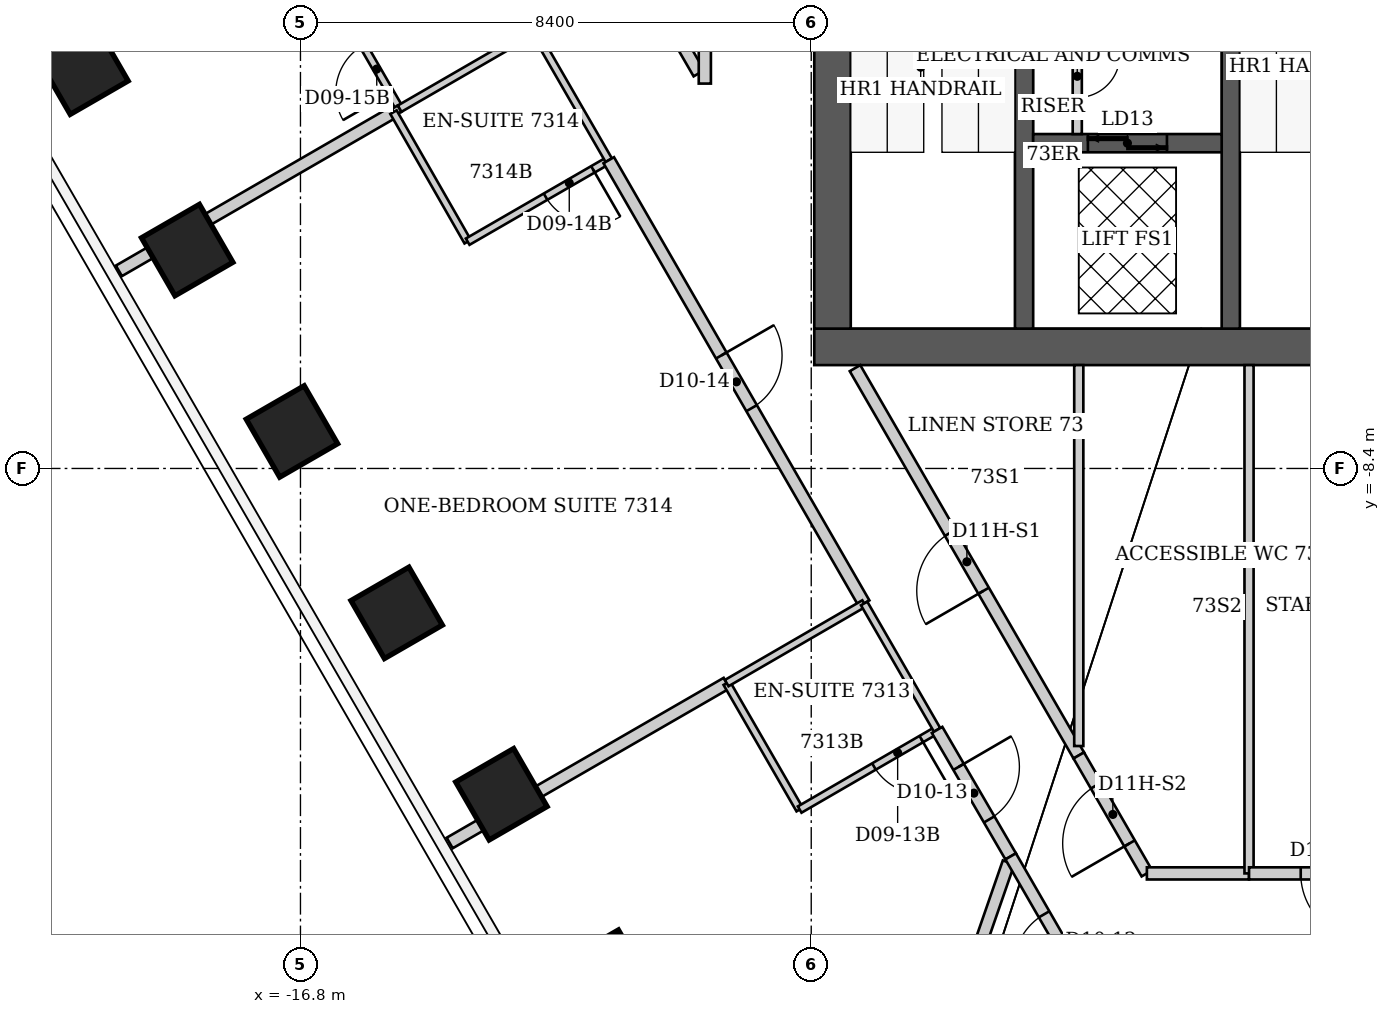
"""IFC4 building model, lengths in metres.
Left out: names, types, materials, properties, quantities, classifications, styles, units other than length and angle.
Written with IfcOpenShell. Run it as: python <this file> out.ifc"""

import sys

from ifc_helpers import new_model, si_unit, direction, frame, frame_2d, origin, origin_2d, place, context, subcontext, project, spatial, rectangle, extrude, element, fill, save


model = new_model("IFC4")
c1 = context("Model", 3, precision=1e-05, world=origin(), true_north=direction((0.0, 1.0)))
c2 = subcontext(c1, "Body", "Model", "MODEL_VIEW")
j1 = project(units=[si_unit("LENGTHUNIT", "METRE"), si_unit("PLANEANGLEUNIT", "RADIAN")], contexts=[c1])
p1 = place(None, origin())
s1 = spatial("IfcSite", under=j1, at=p1, CompositionType="ELEMENT")
p2 = place(p1, origin())
s2 = spatial("IfcBuilding", under=s1, at=p2, CompositionType="ELEMENT")
p3 = place(p2, frame((0.0, 0.0, 291.2)))
s3 = spatial("IfcBuildingStorey", under=s2, at=p3, CompositionType="ELEMENT", Elevation=291.2)
for number, where, z_axis, x_axis in (
    (1, (-11.773, -16.742, 0.0), (0.0, 0.0, 1.0), (-0.866, -0.5, 0.0)),
    (2, (-13.495, -13.759, 0.0), (0.0, 0.0, 1.0), (-0.866, -0.5, 0.0)),
    (3, (-15.218, -10.775, 0.0), (0.0, 0.0, 1.0), (-0.866, -0.5, 0.0)),
    (4, (-16.94, -7.792, 0.0), (0.0, 0.0, 1.0), (-0.866, -0.5, 0.0)),
    (5, (-18.663, -4.808, 0.0), (0.0, 0.0, 1.0), (-0.866, -0.5, 0.0)),
    (6, (-20.385, -1.824, 0.0), (0.0, 0.0, 1.0), (-0.866, -0.5, 0.0)),
):
    element("IfcColumn", number, at=place(p3, frame(where, z_axis=z_axis, x_axis=x_axis)), inside=s3, PredefinedType="COLUMN", context=c2, shape_type="SweptSolid", body=[
        extrude(rectangle(XDim=1.1, YDim=1.1, at=origin_2d()), origin(), (0.0, 0.0, 1.0), 3.8),
    ])
p4 = place(p3, frame((-8.35, -6.4, 0.0), z_axis=(0.0, 0.0, 1.0), x_axis=(1.0, 0.0, 0.0)))
e7 = element("IfcWall", 7, at=p4, inside=s3, PredefinedType="SHEAR", context=c2, shape_type="SweptSolid", body=[
    extrude(rectangle(XDim=16.7, YDim=0.6, at=frame_2d((8.35, 0.0))), origin(), (0.0, 0.0, 1.0), 3.8),
])
p5 = place(p3, frame((-8.05, -6.1, 0.0), z_axis=(0.0, 0.0, 1.0), x_axis=(0.0, 1.0, 0.0)))
e8 = element("IfcWall", 8, at=p5, inside=s3, PredefinedType="SHEAR", context=c2, shape_type="SweptSolid", body=[
    extrude(rectangle(XDim=12.2, YDim=0.6, at=frame_2d((6.1, 0.0))), origin(), (0.0, 0.0, 1.0), 3.8),
])
p6 = place(p5, frame((7.6, 0.0, 0.0)))
e9 = element("IfcOpeningElement", 9, at=p6, cuts=e8, PredefinedType="OPENING", context=c2, shape_type="SweptSolid", body=[
    extrude(rectangle(XDim=1.2, YDim=2.2, at=frame_2d((0.6, 1.1))), frame((0.0, 0.3, 0.0), z_axis=(0.0, -1.0, 0.0), x_axis=(1.0, 0.0, 0.0)), (0.0, 0.0, 1.0), 0.6),
])
for number, where, z_axis, x_axis in (
    (10, (-4.9, -6.1, 0.0), (0.0, 0.0, 1.0), (0.0, 1.0, 0.0)),
    (11, (-1.5, -6.1, 0.0), (0.0, 0.0, 1.0), (0.0, 1.0, 0.0)),
):
    element("IfcWall", number, at=place(p3, frame(where, z_axis=z_axis, x_axis=x_axis)), inside=s3, PredefinedType="SHEAR", context=c2, shape_type="SweptSolid", body=[
        extrude(rectangle(XDim=7.2, YDim=0.3, at=frame_2d((3.6, 0.0))), origin(), (0.0, 0.0, 1.0), 3.8),
    ])
p7 = place(p3, frame((-4.75, -3.05, 0.0), z_axis=(0.0, 0.0, 1.0), x_axis=(1.0, 0.0, 0.0)))
e12 = element("IfcWall", 12, at=p7, inside=s3, PredefinedType="SHEAR", context=c2, shape_type="SweptSolid", body=[
    extrude(rectangle(XDim=3.1, YDim=0.3, at=frame_2d((1.55, 0.0))), origin(), (0.0, 0.0, 1.0), 3.8),
])
p8 = place(p7, frame((0.9, 0.0, 0.0)))
e13 = element("IfcOpeningElement", 13, at=p8, cuts=e12, PredefinedType="OPENING", context=c2, shape_type="SweptSolid", body=[
    extrude(rectangle(XDim=1.3, YDim=2.1, at=frame_2d((0.65, 1.05))), frame((0.0, 0.15, 0.0), z_axis=(0.0, -1.0, 0.0), x_axis=(1.0, 0.0, 0.0)), (0.0, 0.0, 1.0), 0.3),
])
p9 = place(p3, frame((-19.786, -5.15, 0.0), z_axis=(0.0, 0.0, 1.0), x_axis=(0.865819112627, 0.500357136663, 0.0)))
e14 = element("IfcWall", 14, at=p9, inside=s3, PredefinedType="PARTITIONING", context=c2, shape_type="SweptSolid", body=[
    extrude(rectangle(XDim=5.216, YDim=0.2, at=frame_2d((2.608, 0.0))), origin(), (0.0, 0.0, 1.0), 3.64),
])
p10 = place(p3, frame((-16.47, -0.23, 0.0), z_axis=(0.0, 0.0, 1.0), x_axis=(0.500291685314, -0.865856933682, 0.0)))
e15 = element("IfcWall", 15, at=p10, inside=s3, PredefinedType="PARTITIONING", context=c2, shape_type="SweptSolid", body=[
    extrude(rectangle(XDim=2.599, YDim=0.12, at=frame_2d((1.299, 0.0))), origin(), (0.0, 0.0, 1.0), 3.64),
])
p11 = place(p10, frame((1.399, 0.0, 0.0)))
e16 = element("IfcOpeningElement", 16, at=p11, cuts=e15, PredefinedType="OPENING", context=c2, shape_type="SweptSolid", body=[
    extrude(rectangle(XDim=0.9, YDim=2.03, at=frame_2d((0.45, 1.015))), frame((0.0, 0.06, 0.0), z_axis=(0.0, -1.0, 0.0), x_axis=(1.0, 0.0, 0.0)), (0.0, 0.0, 1.0), 0.12),
])
p12 = place(p3, frame((-15.27, -2.54, 0.0), z_axis=(0.0, 0.0, 1.0), x_axis=(0.864612942288, 0.502438513678, 0.0)))
e17 = element("IfcWall", 17, at=p12, inside=s3, PredefinedType="PARTITIONING", context=c2, shape_type="SweptSolid", body=[
    extrude(rectangle(XDim=0.117, YDim=0.12, at=frame_2d((0.058, 0.0))), origin(), (0.0, 0.0, 1.0), 3.64),
])
p13 = place(p3, frame((-15.27, -2.54, 0.0), z_axis=(0.0, 0.0, 1.0), x_axis=(0.497027744361, -0.86773464915, 0.0)))
e18 = element("IfcWall", 18, at=p13, inside=s3, PredefinedType="PARTITIONING", context=c2, shape_type="SweptSolid", body=[
    extrude(rectangle(XDim=2.455, YDim=0.12, at=frame_2d((1.227, 0.0))), origin(), (0.0, 0.0, 1.0), 3.64),
])
p14 = place(p3, frame((-15.169, -2.482, 0.0), z_axis=(0.0, 0.0, 1.0), x_axis=(0.865723129019, 0.500523190154, 0.0)))
e19 = element("IfcWall", 19, at=p14, inside=s3, PredefinedType="PARTITIONING", context=c2, shape_type="SweptSolid", body=[
    extrude(rectangle(XDim=2.401, YDim=0.12, at=frame_2d((1.201, 0.0))), origin(), (0.0, 0.0, 1.0), 3.64),
])
p15 = place(p3, frame((-14.346, -14.56, 0.0), z_axis=(0.0, 0.0, 1.0), x_axis=(0.8660557602, 0.49994741746, 0.0)))
e20 = element("IfcWall", 20, at=p15, inside=s3, PredefinedType="PARTITIONING", context=c2, shape_type="SweptSolid", body=[
    extrude(rectangle(XDim=5.261, YDim=0.2, at=frame_2d((2.63, 0.0))), origin(), (0.0, 0.0, 1.0), 3.64),
])
p16 = place(p3, frame((-14.05, -4.67, 0.0), z_axis=(0.0, 0.0, 1.0), x_axis=(0.865968562295, 0.500098439427, 0.0)))
e21 = element("IfcWall", 21, at=p16, inside=s3, PredefinedType="PARTITIONING", context=c2, shape_type="SweptSolid", body=[
    extrude(rectangle(XDim=2.679, YDim=0.12, at=frame_2d((1.34, 0.0))), origin(), (0.0, 0.0, 1.0), 3.64),
])
p17 = place(p16, frame((1.479, 0.0, 0.0)))
e22 = element("IfcOpeningElement", 22, at=p17, cuts=e21, PredefinedType="OPENING", context=c2, shape_type="SweptSolid", body=[
    extrude(rectangle(XDim=0.9, YDim=2.03, at=frame_2d((0.45, 1.015))), frame((0.0, 0.06, 0.0), z_axis=(0.0, -1.0, 0.0), x_axis=(1.0, 0.0, 0.0)), (0.0, 0.0, 1.0), 0.12),
])
p18 = place(p3, frame((-12.955, -1.207, 0.0), z_axis=(0.0, 0.0, 1.0), x_axis=(0.499920767294, -0.866071143976, 0.0)))
e23 = element("IfcWall", 23, at=p18, inside=s3, PredefinedType="PARTITIONING", context=c2, shape_type="SweptSolid", body=[
    extrude(rectangle(XDim=2.451, YDim=0.12, at=frame_2d((1.226, 0.0))), origin(), (0.0, 0.0, 1.0), 3.64),
])
p19 = place(p3, frame((-11.73, -3.33, 0.0), z_axis=(0.0, 0.0, 1.0), x_axis=(0.499214067722, -0.866478686748, 0.0)))
e24 = element("IfcWall", 24, at=p19, inside=s3, PredefinedType="PARTITIONING", context=c2, shape_type="SweptSolid", body=[
    extrude(rectangle(XDim=8.413, YDim=0.2, at=frame_2d((4.207, 0.0))), origin(), (0.0, 0.0, 1.0), 3.64),
])
p20 = place(p19, frame((3.707, 0.0, 0.0)))
e25 = element("IfcOpeningElement", 25, at=p20, cuts=e24, PredefinedType="OPENING", context=c2, shape_type="SweptSolid", body=[
    extrude(rectangle(XDim=1.0, YDim=2.13, at=frame_2d((0.5, 1.065))), frame((0.0, 0.1, 0.0), z_axis=(0.0, -1.0, 0.0), x_axis=(1.0, 0.0, 0.0)), (0.0, 0.0, 1.0), 0.2),
])
p21 = place(p3, frame((-10.248, -1.901, 0.0), z_axis=(0.0, 0.0, 1.0), x_axis=(-0.500611305161, 0.865672178798, 0.0)))
e26 = element("IfcWall", 26, at=p21, inside=s3, PredefinedType="PARTITIONING", context=c2, shape_type="SweptSolid", body=[
    extrude(rectangle(XDim=5.119, YDim=0.2, at=frame_2d((2.559, 0.0))), origin(), (0.0, 0.0, 1.0), 3.64),
])
p22 = place(p3, frame((-10.15, 7.14, 0.0), z_axis=(0.0, 0.0, 1.0), x_axis=(0.0, -1.0, 0.0)))
e27 = element("IfcWall", 27, at=p22, inside=s3, PredefinedType="PARTITIONING", context=c2, shape_type="SweptSolid", body=[
    extrude(rectangle(XDim=9.21, YDim=0.2, at=frame_2d((4.605, 0.0))), origin(), (0.0, 0.0, 1.0), 3.64),
])
p23 = place(p22, frame((4.055, 0.0, 0.0)))
e28 = element("IfcOpeningElement", 28, at=p23, cuts=e27, PredefinedType="OPENING", context=c2, shape_type="SweptSolid", body=[
    extrude(rectangle(XDim=1.1, YDim=2.2, at=frame_2d((0.55, 1.1))), frame((0.0, 0.1, 0.0), z_axis=(0.0, -1.0, 0.0), x_axis=(1.0, 0.0, 0.0)), (0.0, 0.0, 1.0), 0.2),
])
p24 = place(p3, frame((-9.79, -11.93, 0.0), z_axis=(0.0, 0.0, 1.0), x_axis=(0.499693115345, -0.866202511239, 0.0)))
e29 = element("IfcWall", 29, at=p24, inside=s3, PredefinedType="PARTITIONING", context=c2, shape_type="SweptSolid", body=[
    extrude(rectangle(XDim=2.401, YDim=0.12, at=frame_2d((1.201, 0.0))), origin(), (0.0, 0.0, 1.0), 3.64),
])
p25 = place(p3, frame((-9.79, -11.93, 0.0), z_axis=(0.0, 0.0, 1.0), x_axis=(0.865195830568, 0.501434118073, 0.0)))
e30 = element("IfcWall", 30, at=p25, inside=s3, PredefinedType="PARTITIONING", context=c2, shape_type="SweptSolid", body=[
    extrude(rectangle(XDim=2.612, YDim=0.12, at=frame_2d((1.306, 0.0))), origin(), (0.0, 0.0, 1.0), 3.64),
])
p26 = place(p3, frame((-8.59, -14.01, 0.0), z_axis=(0.0, 0.0, 1.0), x_axis=(0.865155281359, 0.50150407689, 0.0)))
e31 = element("IfcWall", 31, at=p26, inside=s3, PredefinedType="PARTITIONING", context=c2, shape_type="SweptSolid", body=[
    extrude(rectangle(XDim=2.612, YDim=0.12, at=frame_2d((1.306, 0.0))), origin(), (0.0, 0.0, 1.0), 3.64),
])
p27 = place(p26, frame((1.412, 0.0, 0.0)))
e32 = element("IfcOpeningElement", 32, at=p27, cuts=e31, PredefinedType="OPENING", context=c2, shape_type="SweptSolid", body=[
    extrude(rectangle(XDim=0.9, YDim=2.03, at=frame_2d((0.45, 1.015))), frame((0.0, 0.06, 0.0), z_axis=(0.0, -1.0, 0.0), x_axis=(1.0, 0.0, 0.0)), (0.0, 0.0, 1.0), 0.12),
])
p28 = place(p3, frame((-8.45, -24.382, 0.0), z_axis=(0.0, 0.0, 1.0), x_axis=(0.327695764917, 0.944783300898, 0.0)))
e33 = element("IfcWall", 33, at=p28, inside=s3, PredefinedType="PARTITIONING", context=c2, shape_type="SweptSolid", body=[
    extrude(rectangle(XDim=10.058, YDim=0.2, at=frame_2d((5.029, 0.0))), origin(), (0.0, 0.0, 1.0), 3.64),
])
p29 = place(p3, frame((-7.53, -10.62, 0.0), z_axis=(0.0, 0.0, 1.0), x_axis=(0.499737123639, -0.866177122335, 0.0)))
e34 = element("IfcWall", 34, at=p29, inside=s3, PredefinedType="PARTITIONING", context=c2, shape_type="SweptSolid", body=[
    extrude(rectangle(XDim=2.401, YDim=0.12, at=frame_2d((1.201, 0.0))), origin(), (0.0, 0.0, 1.0), 3.64),
])
p30 = place(p3, frame((-6.33, -12.7, 0.0), z_axis=(0.0, 0.0, 1.0), x_axis=(0.502810888564, -0.864396442809, 0.0)))
e35 = element("IfcWall", 35, at=p30, inside=s3, PredefinedType="PARTITIONING", context=c2, shape_type="SweptSolid", body=[
    extrude(rectangle(XDim=2.406, YDim=0.2, at=frame_2d((1.203, 0.0))), origin(), (0.0, 0.0, 1.0), 3.64),
])
p31 = place(p30, frame((0.703, 0.0, 0.0)))
e36 = element("IfcOpeningElement", 36, at=p31, cuts=e35, PredefinedType="OPENING", context=c2, shape_type="SweptSolid", body=[
    extrude(rectangle(XDim=1.0, YDim=2.13, at=frame_2d((0.5, 1.065))), frame((0.0, 0.1, 0.0), z_axis=(0.0, -1.0, 0.0), x_axis=(1.0, 0.0, 0.0)), (0.0, 0.0, 1.0), 0.2),
])
p32 = place(p3, frame((-5.12, -14.78, 0.0), z_axis=(0.0, 0.0, 1.0), x_axis=(0.499813401482, -0.866133109688, 0.0)))
e37 = element("IfcWall", 37, at=p32, inside=s3, PredefinedType="PARTITIONING", context=c2, shape_type="SweptSolid", body=[
    extrude(rectangle(XDim=2.401, YDim=0.2, at=frame_2d((1.201, 0.0))), origin(), (0.0, 0.0, 1.0), 3.64),
])
p33 = place(p32, frame((1.1, 0.0, 0.0)))
e38 = element("IfcOpeningElement", 38, at=p33, cuts=e37, PredefinedType="OPENING", context=c2, shape_type="SweptSolid", body=[
    extrude(rectangle(XDim=1.0, YDim=2.13, at=frame_2d((0.5, 1.065))), frame((0.0, 0.1, 0.0), z_axis=(0.0, -1.0, 0.0), x_axis=(1.0, 0.0, 0.0)), (0.0, 0.0, 1.0), 0.2),
])
p34 = place(p3, frame((-4.0, -13.12, 0.0), z_axis=(0.0, 0.0, 1.0), x_axis=(-0.500218436225, 0.865899252835, 0.0)))
e39 = element("IfcWall", 39, at=p34, inside=s3, PredefinedType="PARTITIONING", context=c2, shape_type="SweptSolid", body=[
    extrude(rectangle(XDim=7.357, YDim=0.2, at=frame_2d((3.678, 0.0))), origin(), (0.0, 0.0, 1.0), 3.64),
])
p35 = place(p34, frame((3.128, 0.0, 0.0)))
e40 = element("IfcOpeningElement", 40, at=p35, cuts=e39, PredefinedType="OPENING", context=c2, shape_type="SweptSolid", body=[
    extrude(rectangle(XDim=1.1, YDim=2.2, at=frame_2d((0.55, 1.1))), frame((0.0, 0.1, 0.0), z_axis=(0.0, -1.0, 0.0), x_axis=(1.0, 0.0, 0.0)), (0.0, 0.0, 1.0), 0.2),
])
p36 = place(p3, frame((-4.0, -6.7, 0.0), z_axis=(0.0, 0.0, 1.0), x_axis=(0.0, -1.0, 0.0)))
e41 = element("IfcWall", 41, at=p36, inside=s3, PredefinedType="PARTITIONING", context=c2, shape_type="SweptSolid", body=[
    extrude(rectangle(XDim=6.265, YDim=0.15, at=frame_2d((3.133, 0.0))), origin(), (0.0, 0.0, 1.0), 3.64),
])
p37 = place(p3, frame((-2.88, -15.06, 0.0), z_axis=(0.0, 0.0, 1.0), x_axis=(-0.499983441833, 0.866034963436, 0.0)))
e42 = element("IfcWall", 42, at=p37, inside=s3, PredefinedType="PARTITIONING", context=c2, shape_type="SweptSolid", body=[
    extrude(rectangle(XDim=2.24, YDim=0.2, at=frame_2d((1.12, 0.0))), origin(), (0.0, 0.0, 1.0), 3.64),
])
p38 = place(p37, frame((0.57, 0.0, 0.0)))
e43 = element("IfcOpeningElement", 43, at=p38, cuts=e42, PredefinedType="OPENING", context=c2, shape_type="SweptSolid", body=[
    extrude(rectangle(XDim=1.1, YDim=2.2, at=frame_2d((0.55, 1.1))), frame((0.0, 0.1, 0.0), z_axis=(0.0, -1.0, 0.0), x_axis=(1.0, 0.0, 0.0)), (0.0, 0.0, 1.0), 0.2),
])
p39 = place(p3, frame((-1.2, -15.06, 0.0), z_axis=(0.0, 0.0, 1.0), x_axis=(-1.0, 0.0, 0.0)))
e44 = element("IfcWall", 44, at=p39, inside=s3, PredefinedType="PARTITIONING", context=c2, shape_type="SweptSolid", body=[
    extrude(rectangle(XDim=1.68, YDim=0.2, at=frame_2d((0.84, 0.0))), origin(), (0.0, 0.0, 1.0), 3.64),
])
p40 = place(p3, frame((-1.2, -6.7, 0.0), z_axis=(0.0, 0.0, 1.0), x_axis=(0.0, -1.0, 0.0)))
e45 = element("IfcWall", 45, at=p40, inside=s3, PredefinedType="PARTITIONING", context=c2, shape_type="SweptSolid", body=[
    extrude(rectangle(XDim=8.36, YDim=0.15, at=frame_2d((4.18, 0.0))), origin(), (0.0, 0.0, 1.0), 3.64),
])
p41 = place(p3, frame((1.6, -15.06, 0.0), z_axis=(0.0, 0.0, 1.0), x_axis=(-1.0, 0.0, 0.0)))
e46 = element("IfcWall", 46, at=p41, inside=s3, PredefinedType="PARTITIONING", context=c2, shape_type="SweptSolid", body=[
    extrude(rectangle(XDim=2.8, YDim=0.2, at=frame_2d((1.4, 0.0))), origin(), (0.0, 0.0, 1.0), 3.64),
])
p42 = place(p41, frame((0.85, 0.0, 0.0)))
e47 = element("IfcOpeningElement", 47, at=p42, cuts=e46, PredefinedType="OPENING", context=c2, shape_type="SweptSolid", body=[
    extrude(rectangle(XDim=1.1, YDim=2.2, at=frame_2d((0.55, 1.1))), frame((0.0, 0.1, 0.0), z_axis=(0.0, -1.0, 0.0), x_axis=(1.0, 0.0, 0.0)), (0.0, 0.0, 1.0), 0.2),
])
p43 = place(p3, frame((-4.025, -2.9, 0.0), z_axis=(0.0, 0.0, 1.0), x_axis=(0.0, 1.0, 0.0)))
e48 = element("IfcWall", 48, at=p43, inside=s3, PredefinedType="PARTITIONING", context=c2, shape_type="SweptSolid", body=[
    extrude(rectangle(XDim=1.775, YDim=0.15, at=frame_2d((0.887, 0.0))), origin(), (0.0, 0.0, 1.0), 3.64),
])
p44 = place(p43, frame((0.6, 0.0, 0.0)))
e49 = element("IfcOpeningElement", 49, at=p44, cuts=e48, PredefinedType="OPENING", context=c2, shape_type="SweptSolid", body=[
    extrude(rectangle(XDim=0.7, YDim=2.1, at=frame_2d((0.35, 1.05))), frame((0.0, 0.075, 0.0), z_axis=(0.0, -1.0, 0.0), x_axis=(1.0, 0.0, 0.0)), (0.0, 0.0, 1.0), 0.15),
])
p45 = place(p33, origin())
e50 = element("IfcDoor", 50, at=p45, inside=s3, OperationType="SINGLE_SWING_RIGHT", PredefinedType="DOOR", context=c2, shape_type="SweptSolid", body=[
    extrude(rectangle(XDim=1.0, YDim=2.13, at=frame_2d((0.5, 1.065))), frame((0.0, 0.025, 0.0), z_axis=(0.0, -1.0, 0.0), x_axis=(1.0, 0.0, 0.0)), (0.0, 0.0, 1.0), 0.05),
])
fill(e38, e50)
p46 = place(p31, origin())
e51 = element("IfcDoor", 51, at=p46, inside=s3, OperationType="SINGLE_SWING_LEFT", PredefinedType="DOOR", context=c2, shape_type="SweptSolid", body=[
    extrude(rectangle(XDim=1.0, YDim=2.13, at=frame_2d((0.5, 1.065))), frame((0.0, 0.025, 0.0), z_axis=(0.0, -1.0, 0.0), x_axis=(1.0, 0.0, 0.0)), (0.0, 0.0, 1.0), 0.05),
])
fill(e36, e51)
p47 = place(p27, origin())
e52 = element("IfcDoor", 52, at=p47, inside=s3, OperationType="SINGLE_SWING_RIGHT", PredefinedType="DOOR", context=c2, shape_type="SweptSolid", body=[
    extrude(rectangle(XDim=0.9, YDim=2.03, at=frame_2d((0.45, 1.015))), frame((0.0, 0.025, 0.0), z_axis=(0.0, -1.0, 0.0), x_axis=(1.0, 0.0, 0.0)), (0.0, 0.0, 1.0), 0.05),
])
fill(e32, e52)
p48 = place(p20, origin())
e53 = element("IfcDoor", 53, at=p48, inside=s3, OperationType="SINGLE_SWING_LEFT", PredefinedType="DOOR", context=c2, shape_type="SweptSolid", body=[
    extrude(rectangle(XDim=1.0, YDim=2.13, at=frame_2d((0.5, 1.065))), frame((0.0, 0.025, 0.0), z_axis=(0.0, -1.0, 0.0), x_axis=(1.0, 0.0, 0.0)), (0.0, 0.0, 1.0), 0.05),
])
fill(e25, e53)
p49 = place(p17, origin())
e54 = element("IfcDoor", 54, at=p49, inside=s3, OperationType="SINGLE_SWING_RIGHT", PredefinedType="DOOR", context=c2, shape_type="SweptSolid", body=[
    extrude(rectangle(XDim=0.9, YDim=2.03, at=frame_2d((0.45, 1.015))), frame((0.0, 0.025, 0.0), z_axis=(0.0, -1.0, 0.0), x_axis=(1.0, 0.0, 0.0)), (0.0, 0.0, 1.0), 0.05),
])
fill(e22, e54)
p50 = place(p11, origin())
e55 = element("IfcDoor", 55, at=p50, inside=s3, OperationType="SINGLE_SWING_RIGHT", PredefinedType="DOOR", context=c2, shape_type="SweptSolid", body=[
    extrude(rectangle(XDim=0.9, YDim=2.03, at=frame_2d((0.45, 1.015))), frame((0.0, 0.025, 0.0), z_axis=(0.0, -1.0, 0.0), x_axis=(1.0, 0.0, 0.0)), (0.0, 0.0, 1.0), 0.05),
])
fill(e16, e55)
p51 = place(p35, origin())
e56 = element("IfcDoor", 56, at=p51, inside=s3, OperationType="SINGLE_SWING_LEFT", PredefinedType="DOOR", context=c2, shape_type="SweptSolid", body=[
    extrude(rectangle(XDim=1.1, YDim=2.2, at=frame_2d((0.55, 1.1))), frame((0.0, 0.025, 0.0), z_axis=(0.0, -1.0, 0.0), x_axis=(1.0, 0.0, 0.0)), (0.0, 0.0, 1.0), 0.05),
])
fill(e40, e56)
p52 = place(p38, origin())
e57 = element("IfcDoor", 57, at=p52, inside=s3, OperationType="SINGLE_SWING_LEFT", PredefinedType="DOOR", context=c2, shape_type="SweptSolid", body=[
    extrude(rectangle(XDim=1.1, YDim=2.2, at=frame_2d((0.55, 1.1))), frame((0.0, 0.025, 0.0), z_axis=(0.0, -1.0, 0.0), x_axis=(1.0, 0.0, 0.0)), (0.0, 0.0, 1.0), 0.05),
])
fill(e43, e57)
p53 = place(p42, origin())
e58 = element("IfcDoor", 58, at=p53, inside=s3, OperationType="SINGLE_SWING_LEFT", PredefinedType="DOOR", context=c2, shape_type="SweptSolid", body=[
    extrude(rectangle(XDim=1.1, YDim=2.2, at=frame_2d((0.55, 1.1))), frame((0.0, 0.025, 0.0), z_axis=(0.0, -1.0, 0.0), x_axis=(1.0, 0.0, 0.0)), (0.0, 0.0, 1.0), 0.05),
])
fill(e47, e58)
p54 = place(p44, origin())
e59 = element("IfcDoor", 59, at=p54, inside=s3, OperationType="SINGLE_SWING_RIGHT", PredefinedType="DOOR", context=c2, shape_type="SweptSolid", body=[
    extrude(rectangle(XDim=0.7, YDim=2.1, at=frame_2d((0.35, 1.05))), frame((0.0, 0.025, 0.0), z_axis=(0.0, -1.0, 0.0), x_axis=(1.0, 0.0, 0.0)), (0.0, 0.0, 1.0), 0.05),
])
fill(e49, e59)
p55 = place(p8, origin())
e60 = element("IfcDoor", 60, at=p55, inside=s3, OperationType="DOUBLE_DOOR_SLIDING", PredefinedType="DOOR", context=c2, shape_type="SweptSolid", body=[
    extrude(rectangle(XDim=1.3, YDim=2.1, at=frame_2d((0.65, 1.05))), frame((0.0, 0.025, 0.0), z_axis=(0.0, -1.0, 0.0), x_axis=(1.0, 0.0, 0.0)), (0.0, 0.0, 1.0), 0.05),
])
fill(e13, e60)
save(model, sys.argv[1])
